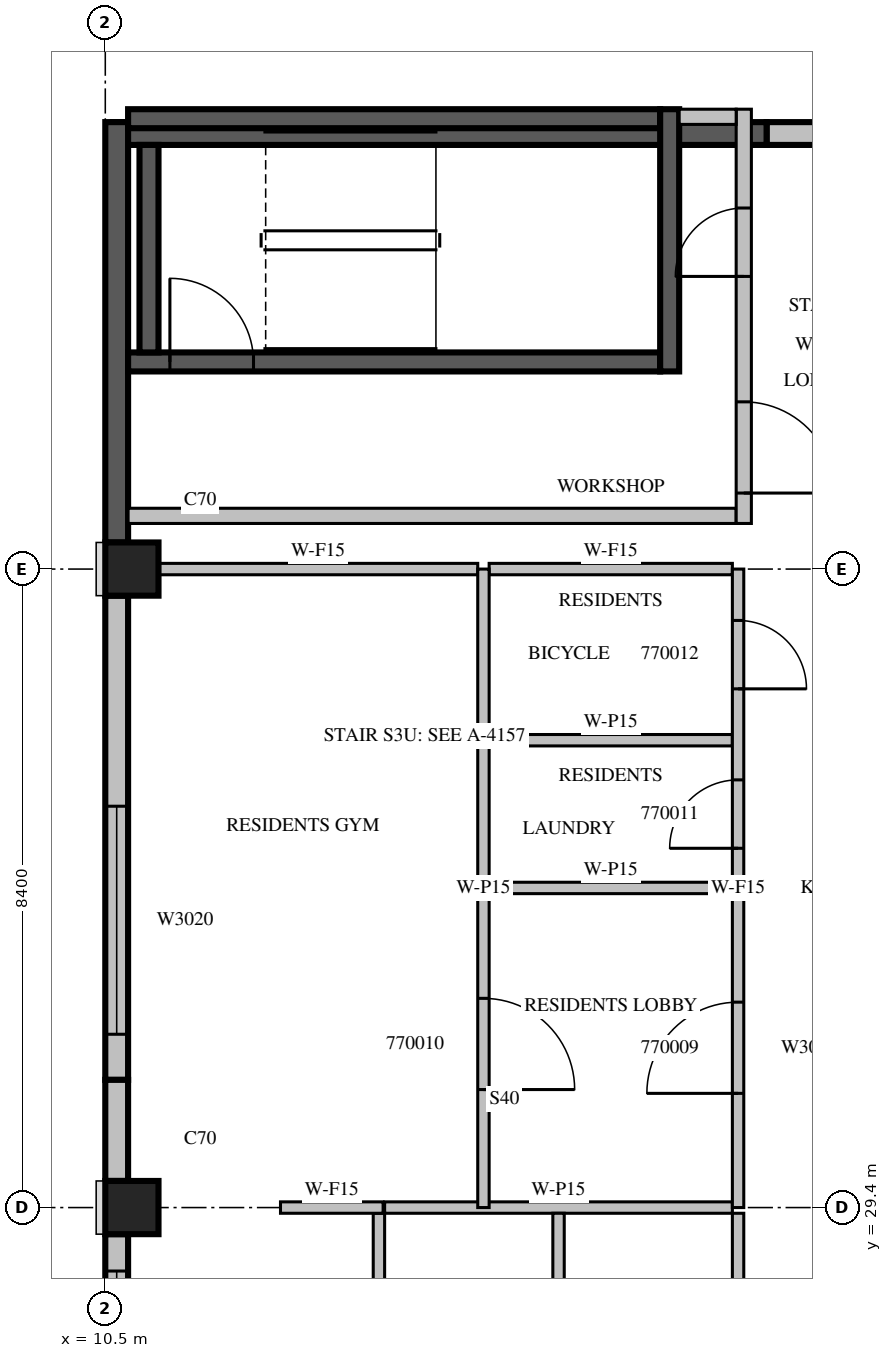
"""IFC4 building model, lengths in metres.
Left out: names, types, materials, properties, quantities, classifications, styles, units other than length and angle.
Written with IfcOpenShell. Run it as: python <this file> out.ifc"""

import sys

from ifc_helpers import new_model, si_unit, direction, frame, frame_2d, origin, origin_2d, place, context, subcontext, project, spatial, rectangle, extrude, source, transform, mapped, element, fill, save


model = new_model("IFC4")
c1 = context("Model", 3, precision=1e-05, world=origin(), true_north=direction((0.0, 1.0)))
c2 = subcontext(c1, "Body", "Model", "MODEL_VIEW")
j1 = project(units=[si_unit("LENGTHUNIT", "METRE"), si_unit("PLANEANGLEUNIT", "RADIAN")], contexts=[c1])
p1 = place(None, origin())
s1 = spatial("IfcSite", under=j1, at=p1, CompositionType="ELEMENT")
p2 = place(p1, origin())
s2 = spatial("IfcBuilding", under=s1, at=p2, CompositionType="ELEMENT")
p3 = place(p2, frame((0.0, 0.0, 305.5)))
s3 = spatial("IfcBuildingStorey", under=s2, at=p3, CompositionType="ELEMENT", Elevation=305.5)
m1 = source(origin(), c2, "Body", "SweptSolid", [
    extrude(rectangle(XDim=0.7, YDim=0.7, at=origin_2d()), origin(), (0.0, 0.0, 1.0), 3.5),
])
for number, where, z_axis, x_axis in (
    (1, (10.85, 29.4, 0.0), (0.0, 0.0, 1.0), (1.0, 0.0, 0.0)),
    (2, (10.85, 37.8, 0.0), (0.0, 0.0, 1.0), (1.0, 0.0, 0.0)),
):
    element("IfcColumn", number, at=place(p3, frame(where, z_axis=z_axis, x_axis=x_axis)), inside=s3, PredefinedType="COLUMN", context=c2, shape_type="MappedRepresentation", body=[
        mapped(m1, transform((0.0, 0.0, 0.0), scale=1.0)),
    ])
m2 = source(origin(), c2, "Body", "SweptSolid", [
    extrude(rectangle(XDim=1.8, YDim=0.3, at=frame_2d((0.9, 0.0))), origin(), (0.0, 0.0, 1.0), 3.1),
])
p4 = place(p3, frame((21.0, 43.53, 0.0), z_axis=(0.0, 0.0, 1.0), x_axis=(-1.0, 0.0, 0.0)))
e3 = element("IfcWall", 3, at=p4, inside=s3, PredefinedType="STANDARD", context=c2, shape_type="MappedRepresentation", body=[
    mapped(m2, transform((0.0, 0.0, 0.0), scale=1.0)),
])
m3 = source(origin(), c2, "Body", "SweptSolid", [
    extrude(rectangle(XDim=8.6, YDim=0.3, at=frame_2d((4.3, 0.0))), origin(), (0.0, 0.0, 1.0), 3.1),
])
p5 = place(p3, frame((19.2, 43.53, 0.0), z_axis=(0.0, 0.0, 1.0), x_axis=(-1.0, 0.0, 0.0)))
e4 = element("IfcWall", 4, at=p5, inside=s3, PredefinedType="SOLIDWALL", context=c2, shape_type="MappedRepresentation", body=[
    mapped(m3, transform((0.0, 0.0, 0.0), scale=1.0)),
])
m4 = source(origin(), c2, "Body", "SweptSolid", [
    extrude(rectangle(XDim=5.53, YDim=0.3, at=frame_2d((2.765, 0.0))), origin(), (0.0, 0.0, 1.0), 3.1),
])
p6 = place(p3, frame((10.65, 43.68, 0.0), z_axis=(0.0, 0.0, 1.0), x_axis=(0.0, -1.0, 0.0)))
e5 = element("IfcWall", 5, at=p6, inside=s3, PredefinedType="SOLIDWALL", context=c2, shape_type="MappedRepresentation", body=[
    mapped(m4, transform((0.0, 0.0, 0.0), scale=1.0)),
])
m5 = source(origin(), c2, "Body", "SweptSolid", [
    extrude(rectangle(XDim=6.37, YDim=0.3, at=frame_2d((3.185, 0.0))), origin(), (0.0, 0.0, 1.0), 3.1),
])
p7 = place(p3, frame((10.65, 37.45, 0.0), z_axis=(0.0, 0.0, 1.0), x_axis=(0.0, -1.0, 0.0)))
e6 = element("IfcWall", 6, at=p7, inside=s3, PredefinedType="STANDARD", context=c2, shape_type="MappedRepresentation", body=[
    mapped(m5, transform((0.0, 0.0, 0.0), scale=1.0)),
])
m6 = source(origin(), c2, "Body", "SweptSolid", [
    extrude(rectangle(XDim=3.0, YDim=2.0, at=frame_2d((1.5, 1.0))), frame((0.0, 0.16, 0.0), z_axis=(0.0, -1.0, 0.0), x_axis=(1.0, 0.0, 0.0)), (0.0, 0.0, 1.0), 0.32),
])
p8 = place(p7, frame((2.77, 0.0, 0.6)))
e7 = element("IfcOpeningElement", 7, at=p8, cuts=e6, PredefinedType="OPENING", context=c2, shape_type="MappedRepresentation", body=[
    mapped(m6, transform((0.0, 0.0, 0.0), scale=1.0)),
])
m7 = source(origin(), c2, "Body", "SweptSolid", [
    extrude(rectangle(XDim=1.33, YDim=0.3, at=frame_2d((0.665, 0.0))), origin(), (0.0, 0.0, 1.0), 3.1),
])
p9 = place(p3, frame((10.65, 31.08, 0.0), z_axis=(0.0, 0.0, 1.0), x_axis=(0.0, -1.0, 0.0)))
e8 = element("IfcWall", 8, at=p9, inside=s3, PredefinedType="STANDARD", context=c2, shape_type="MappedRepresentation", body=[
    mapped(m7, transform((0.0, 0.0, 0.0), scale=1.0)),
])
m8 = source(origin(), c2, "Body", "SweptSolid", [
    extrude(rectangle(XDim=2.17, YDim=0.3, at=frame_2d((1.085, 0.0))), origin(), (0.0, 0.0, 1.0), 3.1),
])
p10 = place(p3, frame((10.65, 29.05, 0.0), z_axis=(0.0, 0.0, 1.0), x_axis=(0.0, -1.0, 0.0)))
e9 = element("IfcWall", 9, at=p10, inside=s3, PredefinedType="STANDARD", context=c2, shape_type="MappedRepresentation", body=[
    mapped(m8, transform((0.0, 0.0, 0.0), scale=1.0)),
])
m9 = source(origin(), c2, "Body", "SweptSolid", [
    extrude(rectangle(XDim=1.2, YDim=2.0, at=frame_2d((0.6, 1.0))), frame((0.0, 0.16, 0.0), z_axis=(0.0, -1.0, 0.0), x_axis=(1.0, 0.0, 0.0)), (0.0, 0.0, 1.0), 0.32),
])
p11 = place(p10, frame((0.485, 0.0, 0.6)))
e10 = element("IfcOpeningElement", 10, at=p11, cuts=e9, PredefinedType="OPENING", context=c2, shape_type="MappedRepresentation", body=[
    mapped(m9, transform((0.0, 0.0, 0.0), scale=1.0)),
])
m10 = source(origin(), c2, "Body", "SweptSolid", [
    extrude(rectangle(XDim=7.0, YDim=0.25, at=frame_2d((3.5, 0.0))), origin(), (0.0, 0.0, 1.0), 3.1),
])
p12 = place(p3, frame((10.8, 40.525, 0.0), z_axis=(0.0, 0.0, 1.0), x_axis=(1.0, 0.0, 0.0)))
e11 = element("IfcWall", 11, at=p12, inside=s3, PredefinedType="SOLIDWALL", context=c2, shape_type="MappedRepresentation", body=[
    mapped(m10, transform((0.0, 0.0, 0.0), scale=1.0)),
])
m11 = source(origin(), c2, "Body", "SweptSolid", [
    extrude(rectangle(XDim=1.1, YDim=2.1, at=frame_2d((0.55, 1.05))), frame((0.0, 0.135, 0.0), z_axis=(0.0, -1.0, 0.0), x_axis=(1.0, 0.0, 0.0)), (0.0, 0.0, 1.0), 0.27),
])
p13 = place(p12, frame((0.55, 0.0, 0.0)))
e12 = element("IfcOpeningElement", 12, at=p13, cuts=e11, PredefinedType="OPENING", context=c2, shape_type="MappedRepresentation", body=[
    mapped(m11, transform((0.0, 0.0, 0.0), scale=1.0)),
])
p14 = place(p3, frame((10.8, 43.725, 0.0), z_axis=(0.0, 0.0, 1.0), x_axis=(1.0, 0.0, 0.0)))
e13 = element("IfcWall", 13, at=p14, inside=s3, PredefinedType="SOLIDWALL", context=c2, shape_type="MappedRepresentation", body=[
    mapped(m10, transform((0.0, 0.0, 0.0), scale=1.0)),
])
m12 = source(origin(), c2, "Body", "SweptSolid", [
    extrude(rectangle(XDim=3.45, YDim=0.25, at=frame_2d((1.725, 0.0))), origin(), (0.0, 0.0, 1.0), 3.1),
])
p15 = place(p3, frame((17.925, 40.4, 0.0), z_axis=(0.0, 0.0, 1.0), x_axis=(0.0, 1.0, 0.0)))
e14 = element("IfcWall", 14, at=p15, inside=s3, PredefinedType="SOLIDWALL", context=c2, shape_type="MappedRepresentation", body=[
    mapped(m12, transform((0.0, 0.0, 0.0), scale=1.0)),
])
m13 = source(origin(), c2, "Body", "SweptSolid", [
    extrude(rectangle(XDim=2.73, YDim=0.25, at=frame_2d((1.365, 0.0))), origin(), (0.0, 0.0, 1.0), 3.1),
])
p16 = place(p3, frame((11.075, 40.65, 0.0), z_axis=(0.0, 0.0, 1.0), x_axis=(0.0, 1.0, 0.0)))
e15 = element("IfcWall", 15, at=p16, inside=s3, PredefinedType="SOLIDWALL", context=c2, shape_type="MappedRepresentation", body=[
    mapped(m13, transform((0.0, 0.0, 0.0), scale=1.0)),
])
m14 = source(origin(), c2, "Body", "SweptSolid", [
    extrude(rectangle(XDim=8.0, YDim=0.2, at=frame_2d((4.0, 0.0))), origin(), (0.0, 0.0, 1.0), 3.1),
])
p17 = place(p3, frame((10.8, 38.5, 0.0), z_axis=(0.0, 0.0, 1.0), x_axis=(1.0, 0.0, 0.0)))
e16 = element("IfcWall", 16, at=p17, inside=s3, PredefinedType="PARTITIONING", context=c2, shape_type="MappedRepresentation", body=[
    mapped(m14, transform((0.0, 0.0, 0.0), scale=1.0)),
])
m15 = source(origin(), c2, "Body", "SweptSolid", [
    extrude(rectangle(XDim=5.45, YDim=0.2, at=frame_2d((2.725, 0.0))), origin(), (0.0, 0.0, 1.0), 3.1),
])
p18 = place(p3, frame((18.9, 38.4, 0.0), z_axis=(0.0, 0.0, 1.0), x_axis=(0.0, 1.0, 0.0)))
e17 = element("IfcWall", 17, at=p18, inside=s3, PredefinedType="PARTITIONING", context=c2, shape_type="MappedRepresentation", body=[
    mapped(m15, transform((0.0, 0.0, 0.0), scale=1.0)),
])
m16 = source(origin(), c2, "Body", "SweptSolid", [
    extrude(rectangle(XDim=1.2, YDim=2.1, at=frame_2d((0.6, 1.05))), frame((0.0, 0.11, 0.0), z_axis=(0.0, -1.0, 0.0), x_axis=(1.0, 0.0, 0.0)), (0.0, 0.0, 1.0), 0.22),
])
p19 = place(p18, frame((0.4, 0.0, 0.0)))
e18 = element("IfcOpeningElement", 18, at=p19, cuts=e17, PredefinedType="OPENING", context=c2, shape_type="MappedRepresentation", body=[
    mapped(m16, transform((0.0, 0.0, 0.0), scale=1.0)),
])
m17 = source(origin(), c2, "Body", "SweptSolid", [
    extrude(rectangle(XDim=0.9, YDim=2.1, at=frame_2d((0.45, 1.05))), frame((0.0, 0.11, 0.0), z_axis=(0.0, -1.0, 0.0), x_axis=(1.0, 0.0, 0.0)), (0.0, 0.0, 1.0), 0.22),
])
p20 = place(p18, frame((3.25, 0.0, 0.0)))
e19 = element("IfcOpeningElement", 19, at=p20, cuts=e17, PredefinedType="OPENING", context=c2, shape_type="MappedRepresentation", body=[
    mapped(m17, transform((0.0, 0.0, 0.0), scale=1.0)),
])
m18 = source(origin(), c2, "Body", "SweptSolid", [
    extrude(rectangle(XDim=0.75, YDim=0.2, at=frame_2d((0.375, 0.0))), origin(), (0.0, 0.0, 1.0), 3.1),
])
p21 = place(p3, frame((18.05, 43.75, 0.0), z_axis=(0.0, 0.0, 1.0), x_axis=(1.0, 0.0, 0.0)))
e20 = element("IfcWall", 20, at=p21, inside=s3, PredefinedType="PARTITIONING", context=c2, shape_type="MappedRepresentation", body=[
    mapped(m18, transform((0.0, 0.0, 0.0), scale=1.0)),
])
m19 = source(origin(), c2, "Body", "SweptSolid", [
    extrude(rectangle(XDim=4.575, YDim=0.15, at=frame_2d((2.288, 0.0))), origin(), (0.0, 0.0, 1.0), 3.1),
])
p22 = place(p3, frame((18.75, 29.4, 0.0), z_axis=(0.0, 0.0, 1.0), x_axis=(-1.0, 0.0, 0.0)))
e21 = element("IfcWall", 21, at=p22, inside=s3, PredefinedType="PARTITIONING", context=c2, shape_type="MappedRepresentation", body=[
    mapped(m19, transform((0.0, 0.0, 0.0), scale=1.0)),
])
m20 = source(origin(), c2, "Body", "SweptSolid", [
    extrude(rectangle(XDim=5.75, YDim=0.15, at=frame_2d((2.875, 0.0))), origin(), (0.0, 0.0, 1.0), 3.1),
])
p23 = place(p3, frame((18.825, 23.575, 0.0), z_axis=(0.0, 0.0, 1.0), x_axis=(0.0, 1.0, 0.0)))
e22 = element("IfcWall", 22, at=p23, inside=s3, PredefinedType="PARTITIONING", context=c2, shape_type="MappedRepresentation", body=[
    mapped(m20, transform((0.0, 0.0, 0.0), scale=1.0)),
])
m21 = source(origin(), c2, "Body", "SweptSolid", [
    extrude(rectangle(XDim=1.0, YDim=2.1, at=frame_2d((0.5, 1.05))), frame((0.0, 0.085, 0.0), z_axis=(0.0, -1.0, 0.0), x_axis=(1.0, 0.0, 0.0)), (0.0, 0.0, 1.0), 0.17),
])
p24 = place(p23, frame((2.375, 0.0, 0.0)))
e23 = element("IfcOpeningElement", 23, at=p24, cuts=e22, PredefinedType="OPENING", context=c2, shape_type="MappedRepresentation", body=[
    mapped(m21, transform((0.0, 0.0, 0.0), scale=1.0)),
])
p25 = place(p3, frame((16.463, 23.575, 0.0), z_axis=(0.0, 0.0, 1.0), x_axis=(0.0, 1.0, 0.0)))
e24 = element("IfcWall", 24, at=p25, inside=s3, PredefinedType="PARTITIONING", context=c2, shape_type="MappedRepresentation", body=[
    mapped(m20, transform((0.0, 0.0, 0.0), scale=1.0)),
])
m22 = source(origin(), c2, "Body", "SweptSolid", [
    extrude(rectangle(XDim=7.725, YDim=0.15, at=frame_2d((3.862, 0.0))), origin(), (0.0, 0.0, 1.0), 3.1),
])
p26 = place(p3, frame((14.1, 29.325, 0.0), z_axis=(0.0, 0.0, 1.0), x_axis=(0.0, -1.0, 0.0)))
e25 = element("IfcWall", 25, at=p26, inside=s3, PredefinedType="PARTITIONING", context=c2, shape_type="MappedRepresentation", body=[
    mapped(m22, transform((0.0, 0.0, 0.0), scale=1.0)),
])
p27 = place(p26, frame((6.275, 0.0, 0.0)))
e26 = element("IfcOpeningElement", 26, at=p27, cuts=e25, PredefinedType="OPENING", context=c2, shape_type="MappedRepresentation", body=[
    mapped(m21, transform((0.0, 0.0, 0.0), scale=1.0)),
])
m23 = source(origin(), c2, "Body", "SweptSolid", [
    extrude(rectangle(XDim=3.2, YDim=0.15, at=frame_2d((1.6, 0.0))), origin(), (0.0, 0.0, 1.0), 3.1),
])
for number, where, z_axis, x_axis in (
    (27, (18.75, 33.605, 0.0), (0.0, 0.0, 1.0), (-1.0, 0.0, 0.0)),
    (28, (18.75, 35.548, 0.0), (0.0, 0.0, 1.0), (-1.0, 0.0, 0.0)),
):
    element("IfcWall", number, at=place(p3, frame(where, z_axis=z_axis, x_axis=x_axis)), inside=s3, PredefinedType="PARTITIONING", context=c2, shape_type="MappedRepresentation", body=[
        mapped(m23, transform((0.0, 0.0, 0.0), scale=1.0)),
    ])
m24 = source(origin(), c2, "Body", "SweptSolid", [
    extrude(rectangle(XDim=1.35, YDim=0.15, at=frame_2d((0.675, 0.0))), origin(), (0.0, 0.0, 1.0), 3.1),
])
p28 = place(p3, frame((14.155, 29.4, 0.0), z_axis=(0.0, 0.0, 1.0), x_axis=(-1.0, 0.0, 0.0)))
e29 = element("IfcWall", 29, at=p28, inside=s3, PredefinedType="PARTITIONING", context=c2, shape_type="MappedRepresentation", body=[
    mapped(m24, transform((0.0, 0.0, 0.0), scale=1.0)),
])
m25 = source(origin(), c2, "Body", "SweptSolid", [
    extrude(rectangle(XDim=4.201, YDim=0.15, at=frame_2d((2.1, 0.0))), origin(), (0.0, 0.0, 1.0), 3.1),
])
p29 = place(p3, frame((15.4, 37.8, 0.0), z_axis=(0.0, 0.0, 1.0), x_axis=(-1.0, 0.0, 0.0)))
e30 = element("IfcWall", 30, at=p29, inside=s3, PredefinedType="PARTITIONING", context=c2, shape_type="MappedRepresentation", body=[
    mapped(m25, transform((0.0, 0.0, 0.0), scale=1.0)),
])
p30 = place(p3, frame((18.75, 37.8, 0.0), z_axis=(0.0, 0.0, 1.0), x_axis=(-1.0, 0.0, 0.0)))
e31 = element("IfcWall", 31, at=p30, inside=s3, PredefinedType="PARTITIONING", context=c2, shape_type="MappedRepresentation", body=[
    mapped(m23, transform((0.0, 0.0, 0.0), scale=1.0)),
])
m26 = source(origin(), c2, "Body", "SweptSolid", [
    extrude(rectangle(XDim=8.4, YDim=0.15, at=frame_2d((4.2, 0.0))), origin(), (0.0, 0.0, 1.0), 3.1),
])
p31 = place(p3, frame((15.475, 29.4, 0.0), z_axis=(0.0, 0.0, 1.0), x_axis=(0.0, 1.0, 0.0)))
e32 = element("IfcWall", 32, at=p31, inside=s3, PredefinedType="PARTITIONING", context=c2, shape_type="MappedRepresentation", body=[
    mapped(m26, transform((0.0, 0.0, 0.0), scale=1.0)),
])
m27 = source(origin(), c2, "Body", "SweptSolid", [
    extrude(rectangle(XDim=1.2, YDim=2.1, at=frame_2d((0.6, 1.05))), frame((0.0, 0.085, 0.0), z_axis=(0.0, -1.0, 0.0), x_axis=(1.0, 0.0, 0.0)), (0.0, 0.0, 1.0), 0.17),
])
p32 = place(p31, frame((1.552, 0.0, 0.0)))
e33 = element("IfcOpeningElement", 33, at=p32, cuts=e32, PredefinedType="OPENING", context=c2, shape_type="MappedRepresentation", body=[
    mapped(m27, transform((0.0, 0.0, 0.0), scale=1.0)),
])
p33 = place(p3, frame((18.825, 29.4, 0.0), z_axis=(0.0, 0.0, 1.0), x_axis=(0.0, 1.0, 0.0)))
e34 = element("IfcWall", 34, at=p33, inside=s3, PredefinedType="PARTITIONING", context=c2, shape_type="MappedRepresentation", body=[
    mapped(m26, transform((0.0, 0.0, 0.0), scale=1.0)),
])
p34 = place(p33, frame((1.502, 0.0, 0.0)))
e35 = element("IfcOpeningElement", 35, at=p34, cuts=e34, PredefinedType="OPENING", context=c2, shape_type="MappedRepresentation", body=[
    mapped(m27, transform((0.0, 0.0, 0.0), scale=1.0)),
])
m28 = source(origin(), c2, "Body", "SweptSolid", [
    extrude(rectangle(XDim=0.9, YDim=2.1, at=frame_2d((0.45, 1.05))), frame((0.0, 0.085, 0.0), z_axis=(0.0, -1.0, 0.0), x_axis=(1.0, 0.0, 0.0)), (0.0, 0.0, 1.0), 0.17),
])
p35 = place(p33, frame((4.727, 0.0, 0.0)))
e36 = element("IfcOpeningElement", 36, at=p35, cuts=e34, PredefinedType="OPENING", context=c2, shape_type="MappedRepresentation", body=[
    mapped(m28, transform((0.0, 0.0, 0.0), scale=1.0)),
])
p36 = place(p33, frame((6.824, 0.0, 0.0)))
e37 = element("IfcOpeningElement", 37, at=p36, cuts=e34, PredefinedType="OPENING", context=c2, shape_type="MappedRepresentation", body=[
    mapped(m28, transform((0.0, 0.0, 0.0), scale=1.0)),
])
m29 = source(origin(), c2, "Body", "SweptSolid", [
    extrude(rectangle(XDim=3.0, YDim=2.0, at=frame_2d((1.5, 1.0))), frame((0.0, 0.03, 0.0), z_axis=(0.0, -1.0, 0.0), x_axis=(1.0, 0.0, 0.0)), (0.0, 0.0, 1.0), 0.06),
])
p37 = place(p8, origin())
e38 = element("IfcWindow", 38, at=p37, inside=s3, PartitioningType="SINGLE_PANEL", PredefinedType="WINDOW", context=c2, shape_type="MappedRepresentation", body=[
    mapped(m29, transform((0.0, 0.0, 0.0), scale=1.0)),
])
fill(e7, e38)
m30 = source(origin(), c2, "Body", "SweptSolid", [
    extrude(rectangle(XDim=1.2, YDim=2.0, at=frame_2d((0.6, 1.0))), frame((0.0, 0.03, 0.0), z_axis=(0.0, -1.0, 0.0), x_axis=(1.0, 0.0, 0.0)), (0.0, 0.0, 1.0), 0.06),
])
p38 = place(p11, origin())
e39 = element("IfcWindow", 39, at=p38, inside=s3, PartitioningType="SINGLE_PANEL", PredefinedType="WINDOW", context=c2, shape_type="MappedRepresentation", body=[
    mapped(m30, transform((0.0, 0.0, 0.0), scale=1.0)),
])
fill(e10, e39)
m31 = source(origin(), c2, "Body", "SweptSolid", [
    extrude(rectangle(XDim=1.1, YDim=2.1, at=frame_2d((0.55, 1.05))), frame((0.0, 0.025, 0.0), z_axis=(0.0, -1.0, 0.0), x_axis=(1.0, 0.0, 0.0)), (0.0, 0.0, 1.0), 0.05),
])
p39 = place(p13, origin())
e40 = element("IfcDoor", 40, at=p39, inside=s3, OperationType="SINGLE_SWING_LEFT", PredefinedType="DOOR", context=c2, shape_type="MappedRepresentation", body=[
    mapped(m31, transform((0.0, 0.0, 0.0), scale=1.0)),
])
fill(e12, e40)
m32 = source(origin(), c2, "Body", "SweptSolid", [
    extrude(rectangle(XDim=1.2, YDim=2.1, at=frame_2d((0.6, 1.05))), frame((0.0, 0.025, 0.0), z_axis=(0.0, -1.0, 0.0), x_axis=(1.0, 0.0, 0.0)), (0.0, 0.0, 1.0), 0.05),
])
p40 = place(p19, origin())
e41 = element("IfcDoor", 41, at=p40, inside=s3, OperationType="SINGLE_SWING_RIGHT", PredefinedType="DOOR", context=c2, shape_type="MappedRepresentation", body=[
    mapped(m32, transform((0.0, 0.0, 0.0), scale=1.0)),
])
fill(e18, e41)
m33 = source(origin(), c2, "Body", "SweptSolid", [
    extrude(rectangle(XDim=0.9, YDim=2.1, at=frame_2d((0.45, 1.05))), frame((0.0, 0.025, 0.0), z_axis=(0.0, -1.0, 0.0), x_axis=(1.0, 0.0, 0.0)), (0.0, 0.0, 1.0), 0.05),
])
p41 = place(p20, origin())
e42 = element("IfcDoor", 42, at=p41, inside=s3, OperationType="SINGLE_SWING_LEFT", PredefinedType="DOOR", context=c2, shape_type="MappedRepresentation", body=[
    mapped(m33, transform((0.0, 0.0, 0.0), scale=1.0)),
])
fill(e19, e42)
p42 = place(p34, origin())
e43 = element("IfcDoor", 43, at=p42, inside=s3, OperationType="SINGLE_SWING_LEFT", PredefinedType="DOOR", context=c2, shape_type="MappedRepresentation", body=[
    mapped(m32, transform((0.0, 0.0, 0.0), scale=1.0)),
])
fill(e35, e43)
p43 = place(p32, origin())
e44 = element("IfcDoor", 44, at=p43, inside=s3, OperationType="SINGLE_SWING_RIGHT", PredefinedType="DOOR", context=c2, shape_type="MappedRepresentation", body=[
    mapped(m32, transform((0.0, 0.0, 0.0), scale=1.0)),
])
fill(e33, e44)
p44 = place(p35, origin())
e45 = element("IfcDoor", 45, at=p44, inside=s3, OperationType="SINGLE_SWING_LEFT", PredefinedType="DOOR", context=c2, shape_type="MappedRepresentation", body=[
    mapped(m33, transform((0.0, 0.0, 0.0), scale=1.0)),
])
fill(e36, e45)
p45 = place(p36, origin())
e46 = element("IfcDoor", 46, at=p45, inside=s3, OperationType="SINGLE_SWING_RIGHT", PredefinedType="DOOR", context=c2, shape_type="MappedRepresentation", body=[
    mapped(m33, transform((0.0, 0.0, 0.0), scale=1.0)),
])
fill(e37, e46)
save(model, sys.argv[1])
